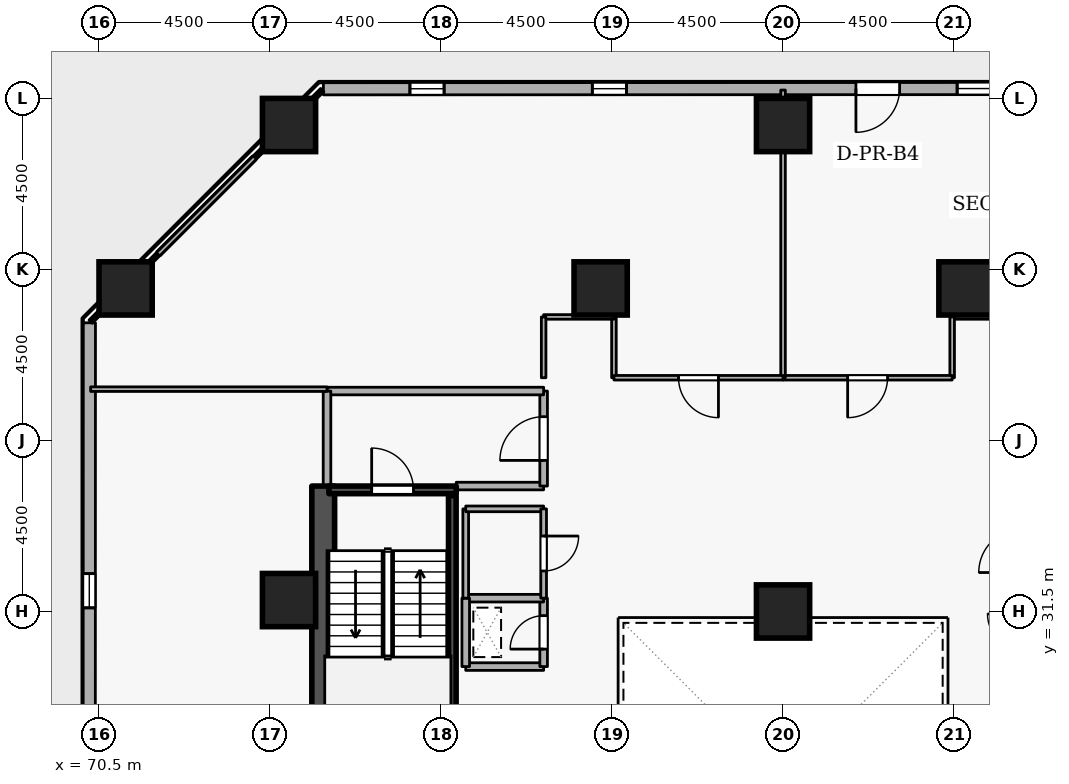
"""IFC4 building model, lengths in metres.
Left out: names, types, materials, properties, quantities, classifications, styles, units other than length and angle.
Written with IfcOpenShell. Run it as: python <this file> out.ifc"""

import sys

from ifc_helpers import new_model, si_unit, direction, frame, frame_2d, origin, origin_2d, place, context, subcontext, project, spatial, rectangle, extrude, element, fill, save


model = new_model("IFC4")
c1 = context("Model", 3, precision=1e-05, world=origin(), true_north=direction((0.0, 1.0)))
c2 = subcontext(c1, "Body", "Model", "MODEL_VIEW")
j1 = project(units=[si_unit("LENGTHUNIT", "METRE"), si_unit("PLANEANGLEUNIT", "RADIAN")], contexts=[c1])
p1 = place(None, origin())
s1 = spatial("IfcSite", under=j1, at=p1, CompositionType="ELEMENT")
p2 = place(p1, origin())
s2 = spatial("IfcBuilding", under=s1, at=p2, CompositionType="ELEMENT")
p3 = place(p2, frame((0.0, 0.0, 27.9)))
s3 = spatial("IfcBuildingStorey", under=s2, at=p3, CompositionType="ELEMENT", Elevation=27.9)
p4 = place(p3, frame((76.4, 19.2, 0.0), z_axis=(0.0, 0.0, 1.0), x_axis=(0.0, 1.0, 0.0)))
e1 = element("IfcWall", 1, at=p4, inside=s3, PredefinedType="SHEAR", context=c2, shape_type="SweptSolid", body=[
    extrude(rectangle(XDim=15.6, YDim=0.6, at=frame_2d((7.8, 0.0))), origin(), (0.0, 0.0, 1.0), 3.6),
])
for number, where, z_axis, x_axis in (
    (2, (88.5, 44.3, 0.0), (0.0, 0.0, 1.0), (1.0, 0.0, 0.0)),
    (3, (75.5, 44.3, 0.0), (0.0, 0.0, 1.0), (1.0, 0.0, 0.0)),
    (4, (71.2, 40.0, 0.0), (0.0, 0.0, 1.0), (1.0, 0.0, 0.0)),
    (5, (93.3, 40.0, 0.0), (0.0, 0.0, 1.0), (1.0, 0.0, 0.0)),
    (6, (83.7, 40.0, 0.0), (0.0, 0.0, 1.0), (1.0, 0.0, 0.0)),
    (7, (75.5, 31.8, 0.0), (0.0, 0.0, 1.0), (1.0, 0.0, 0.0)),
    (8, (88.5, 31.5, 0.0), (0.0, 0.0, 1.0), (1.0, 0.0, 0.0)),
):
    element("IfcColumn", number, at=place(p3, frame(where, z_axis=z_axis, x_axis=x_axis)), inside=s3, PredefinedType="COLUMN", context=c2, shape_type="SweptSolid", body=[
        extrude(rectangle(XDim=1.4, YDim=1.4, at=origin_2d()), origin(), (0.0, 0.0, 1.0), 3.6),
    ])
p5 = place(p3, frame((110.181, 45.265, 0.0), z_axis=(0.0, 0.0, 1.0), x_axis=(-0.999999942296, -0.000339718087, 0.0)))
e9 = element("IfcWall", 9, at=p5, inside=s3, PredefinedType="STANDARD", context=c2, shape_type="SweptSolid", body=[
    extrude(rectangle(XDim=33.777, YDim=0.32, at=frame_2d((16.888, 0.0))), origin(), (0.0, 0.0, 1.0), 2.7),
])
p6 = place(p5, frame((18.614, 0.0, 0.0)))
e10 = element("IfcOpeningElement", 10, at=p6, cuts=e9, PredefinedType="OPENING", context=c2, shape_type="SweptSolid", body=[
    extrude(rectangle(XDim=1.15, YDim=2.1, at=frame_2d((0.575, 1.05))), frame((0.0, 0.17, 0.0), z_axis=(0.0, -1.0, 0.0), x_axis=(1.0, 0.0, 0.0)), (0.0, 0.0, 1.0), 0.34),
])
p7 = place(p5, frame((1.8, 0.0, 0.72)))
e11 = element("IfcOpeningElement", 11, at=p7, cuts=e9, PredefinedType="OPENING", context=c2, shape_type="SweptSolid", body=[
    extrude(rectangle(XDim=0.9, YDim=1.75, at=frame_2d((0.45, 0.875))), frame((0.0, 0.17, 0.0), z_axis=(0.0, -1.0, 0.0), x_axis=(1.0, 0.0, 0.0)), (0.0, 0.0, 1.0), 0.34),
])
p8 = place(p5, frame((6.6, 0.0, 0.72)))
e12 = element("IfcOpeningElement", 12, at=p8, cuts=e9, PredefinedType="OPENING", context=c2, shape_type="SweptSolid", body=[
    extrude(rectangle(XDim=0.9, YDim=1.75, at=frame_2d((0.45, 0.875))), frame((0.0, 0.17, 0.0), z_axis=(0.0, -1.0, 0.0), x_axis=(1.0, 0.0, 0.0)), (0.0, 0.0, 1.0), 0.34),
])
p9 = place(p5, frame((11.4, 0.0, 0.72)))
e13 = element("IfcOpeningElement", 13, at=p9, cuts=e9, PredefinedType="OPENING", context=c2, shape_type="SweptSolid", body=[
    extrude(rectangle(XDim=0.9, YDim=1.75, at=frame_2d((0.45, 0.875))), frame((0.0, 0.17, 0.0), z_axis=(0.0, -1.0, 0.0), x_axis=(1.0, 0.0, 0.0)), (0.0, 0.0, 1.0), 0.34),
])
p10 = place(p5, frame((16.2, 0.0, 0.72)))
e14 = element("IfcOpeningElement", 14, at=p10, cuts=e9, PredefinedType="OPENING", context=c2, shape_type="SweptSolid", body=[
    extrude(rectangle(XDim=0.9, YDim=1.75, at=frame_2d((0.45, 0.875))), frame((0.0, 0.17, 0.0), z_axis=(0.0, -1.0, 0.0), x_axis=(1.0, 0.0, 0.0)), (0.0, 0.0, 1.0), 0.34),
])
p11 = place(p5, frame((25.8, 0.0, 0.72)))
e15 = element("IfcOpeningElement", 15, at=p11, cuts=e9, PredefinedType="OPENING", context=c2, shape_type="SweptSolid", body=[
    extrude(rectangle(XDim=0.9, YDim=1.75, at=frame_2d((0.45, 0.875))), frame((0.0, 0.17, 0.0), z_axis=(0.0, -1.0, 0.0), x_axis=(1.0, 0.0, 0.0)), (0.0, 0.0, 1.0), 0.34),
])
p12 = place(p5, frame((30.6, 0.0, 0.72)))
e16 = element("IfcOpeningElement", 16, at=p12, cuts=e9, PredefinedType="OPENING", context=c2, shape_type="SweptSolid", body=[
    extrude(rectangle(XDim=0.9, YDim=1.75, at=frame_2d((0.45, 0.875))), frame((0.0, 0.17, 0.0), z_axis=(0.0, -1.0, 0.0), x_axis=(1.0, 0.0, 0.0)), (0.0, 0.0, 1.0), 0.34),
])
p13 = place(p3, frame((70.247, 39.096, 0.0), z_axis=(0.0, 0.0, 1.0), x_axis=(-0.000339718087, -0.999999942296, 0.0)))
e17 = element("IfcWall", 17, at=p13, inside=s3, PredefinedType="STANDARD", context=c2, shape_type="SweptSolid", body=[
    extrude(rectangle(XDim=33.777, YDim=0.32, at=frame_2d((16.888, 0.0))), origin(), (0.0, 0.0, 1.0), 2.7),
])
p14 = place(p13, frame((6.6, 0.0, 0.72)))
e18 = element("IfcOpeningElement", 18, at=p14, cuts=e17, PredefinedType="OPENING", context=c2, shape_type="SweptSolid", body=[
    extrude(rectangle(XDim=0.9, YDim=1.75, at=frame_2d((0.45, 0.875))), frame((0.0, 0.17, 0.0), z_axis=(0.0, -1.0, 0.0), x_axis=(1.0, 0.0, 0.0)), (0.0, 0.0, 1.0), 0.34),
])
p15 = place(p13, frame((16.2, 0.0, 0.72)))
e19 = element("IfcOpeningElement", 19, at=p15, cuts=e17, PredefinedType="OPENING", context=c2, shape_type="SweptSolid", body=[
    extrude(rectangle(XDim=0.9, YDim=1.75, at=frame_2d((0.45, 0.875))), frame((0.0, 0.17, 0.0), z_axis=(0.0, -1.0, 0.0), x_axis=(1.0, 0.0, 0.0)), (0.0, 0.0, 1.0), 0.34),
])
p16 = place(p13, frame((21.0, 0.0, 0.72)))
e20 = element("IfcOpeningElement", 20, at=p16, cuts=e17, PredefinedType="OPENING", context=c2, shape_type="SweptSolid", body=[
    extrude(rectangle(XDim=0.9, YDim=1.75, at=frame_2d((0.45, 0.875))), frame((0.0, 0.17, 0.0), z_axis=(0.0, -1.0, 0.0), x_axis=(1.0, 0.0, 0.0)), (0.0, 0.0, 1.0), 0.34),
])
p17 = place(p13, frame((30.6, 0.0, 0.72)))
e21 = element("IfcOpeningElement", 21, at=p17, cuts=e17, PredefinedType="OPENING", context=c2, shape_type="SweptSolid", body=[
    extrude(rectangle(XDim=0.9, YDim=1.75, at=frame_2d((0.45, 0.875))), frame((0.0, 0.17, 0.0), z_axis=(0.0, -1.0, 0.0), x_axis=(1.0, 0.0, 0.0)), (0.0, 0.0, 1.0), 0.34),
])
p18 = place(p3, frame((76.55, 34.7, 0.0), z_axis=(0.0, 0.0, 1.0), x_axis=(1.0, 0.0, 0.0)))
e22 = element("IfcWall", 22, at=p18, inside=s3, PredefinedType="SHEAR", context=c2, shape_type="SweptSolid", body=[
    extrude(rectangle(XDim=3.35, YDim=0.2, at=frame_2d((1.675, 0.0))), origin(), (0.0, 0.0, 1.0), 3.6),
])
p19 = place(p18, frame((1.125, 0.0, 0.0)))
e23 = element("IfcOpeningElement", 23, at=p19, cuts=e22, PredefinedType="OPENING", context=c2, shape_type="SweptSolid", body=[
    extrude(rectangle(XDim=1.1, YDim=2.1, at=frame_2d((0.55, 1.05))), frame((0.0, 0.11, 0.0), z_axis=(0.0, -1.0, 0.0), x_axis=(1.0, 0.0, 0.0)), (0.0, 0.0, 1.0), 0.22),
])
p20 = place(p3, frame((79.797, 27.45, 0.0), z_axis=(0.0, 0.0, 1.0), x_axis=(0.0, 1.0, 0.0)))
e24 = element("IfcWall", 24, at=p20, inside=s3, PredefinedType="SHEAR", context=c2, shape_type="SweptSolid", body=[
    extrude(rectangle(XDim=7.1, YDim=0.2, at=frame_2d((3.55, 0.0))), origin(), (0.0, 0.0, 1.0), 3.6),
])
p21 = place(p3, frame((79.9, 34.8, 0.0), z_axis=(0.0, 0.0, 1.0), x_axis=(1.0, 0.0, 0.0)))
e25 = element("IfcWall", 25, at=p21, inside=s3, PredefinedType="STANDARD", context=c2, shape_type="SweptSolid", body=[
    extrude(rectangle(XDim=2.3, YDim=0.2, at=frame_2d((1.15, 0.0))), origin(), (0.0, 0.0, 1.0), 2.545),
])
p22 = place(p3, frame((82.2, 34.8, 0.0), z_axis=(0.0, 0.0, 1.0), x_axis=(0.0, 1.0, 0.0)))
e26 = element("IfcWall", 26, at=p22, inside=s3, PredefinedType="STANDARD", context=c2, shape_type="SweptSolid", body=[
    extrude(rectangle(XDim=2.5, YDim=0.2, at=frame_2d((1.25, 0.0))), origin(), (0.0, 0.0, 1.0), 3.34),
])
p23 = place(p22, frame((0.675, 0.0, 0.0)))
e27 = element("IfcOpeningElement", 27, at=p23, cuts=e26, PredefinedType="OPENING", context=c2, shape_type="SweptSolid", body=[
    extrude(rectangle(XDim=1.15, YDim=2.1, at=frame_2d((0.575, 1.05))), frame((0.0, 0.11, 0.0), z_axis=(0.0, -1.0, 0.0), x_axis=(1.0, 0.0, 0.0)), (0.0, 0.0, 1.0), 0.22),
])
p24 = place(p3, frame((82.2, 37.3, 0.0), z_axis=(0.0, 0.0, 1.0), x_axis=(-1.0, 0.0, 0.0)))
e28 = element("IfcWall", 28, at=p24, inside=s3, PredefinedType="STANDARD", context=c2, shape_type="SweptSolid", body=[
    extrude(rectangle(XDim=5.7, YDim=0.2, at=frame_2d((2.85, 0.0))), origin(), (0.0, 0.0, 1.0), 3.34),
])
p25 = place(p3, frame((76.5, 37.3, 0.0), z_axis=(0.0, 0.0, 1.0), x_axis=(0.0, -1.0, 0.0)))
e29 = element("IfcWall", 29, at=p25, inside=s3, PredefinedType="STANDARD", context=c2, shape_type="SweptSolid", body=[
    extrude(rectangle(XDim=2.5, YDim=0.2, at=frame_2d((1.25, 0.0))), origin(), (0.0, 0.0, 1.0), 3.34),
])
p26 = place(p3, frame((80.15, 30.05, 0.0), z_axis=(0.0, 0.0, 1.0), x_axis=(1.0, 0.0, 0.0)))
e30 = element("IfcWall", 30, at=p26, inside=s3, PredefinedType="STANDARD", context=c2, shape_type="SweptSolid", body=[
    extrude(rectangle(XDim=2.05, YDim=0.2, at=frame_2d((1.025, 0.0))), origin(), (0.0, 0.0, 1.0), 3.34),
])
p27 = place(p3, frame((82.2, 30.05, 0.0), z_axis=(0.0, 0.0, 1.0), x_axis=(0.0, 1.0, 0.0)))
e31 = element("IfcWall", 31, at=p27, inside=s3, PredefinedType="STANDARD", context=c2, shape_type="SweptSolid", body=[
    extrude(rectangle(XDim=1.8, YDim=0.2, at=frame_2d((0.9, 0.0))), origin(), (0.0, 0.0, 1.0), 3.34),
])
p28 = place(p27, frame((0.46, 0.0, 0.0)))
e32 = element("IfcOpeningElement", 32, at=p28, cuts=e31, PredefinedType="OPENING", context=c2, shape_type="SweptSolid", body=[
    extrude(rectangle(XDim=0.88, YDim=2.04, at=frame_2d((0.44, 1.02))), frame((0.0, 0.11, 0.0), z_axis=(0.0, -1.0, 0.0), x_axis=(1.0, 0.0, 0.0)), (0.0, 0.0, 1.0), 0.22),
])
p29 = place(p3, frame((82.2, 31.85, 0.0), z_axis=(0.0, 0.0, 1.0), x_axis=(-1.0, 0.0, 0.0)))
e33 = element("IfcWall", 33, at=p29, inside=s3, PredefinedType="STANDARD", context=c2, shape_type="SweptSolid", body=[
    extrude(rectangle(XDim=2.05, YDim=0.2, at=frame_2d((1.025, 0.0))), origin(), (0.0, 0.0, 1.0), 3.34),
])
p30 = place(p3, frame((80.15, 31.85, 0.0), z_axis=(0.0, 0.0, 1.0), x_axis=(0.0, -1.0, 0.0)))
e34 = element("IfcWall", 34, at=p30, inside=s3, PredefinedType="STANDARD", context=c2, shape_type="SweptSolid", body=[
    extrude(rectangle(XDim=1.8, YDim=0.2, at=frame_2d((0.9, 0.0))), origin(), (0.0, 0.0, 1.0), 3.34),
])
p31 = place(p3, frame((80.15, 31.85, 0.0), z_axis=(0.0, 0.0, 1.0), x_axis=(0.0, 1.0, 0.0)))
e35 = element("IfcWall", 35, at=p31, inside=s3, PredefinedType="PARTITIONING", context=c2, shape_type="SweptSolid", body=[
    extrude(rectangle(XDim=2.35, YDim=0.15, at=frame_2d((1.175, 0.0))), origin(), (0.0, 0.0, 1.0), 3.34),
])
p32 = place(p3, frame((80.15, 34.2, 0.0), z_axis=(0.0, 0.0, 1.0), x_axis=(1.0, 0.0, 0.0)))
e36 = element("IfcWall", 36, at=p32, inside=s3, PredefinedType="PARTITIONING", context=c2, shape_type="SweptSolid", body=[
    extrude(rectangle(XDim=2.05, YDim=0.15, at=frame_2d((1.025, 0.0))), origin(), (0.0, 0.0, 1.0), 2.545),
])
p33 = place(p3, frame((82.2, 34.2, 0.0), z_axis=(0.0, 0.0, 1.0), x_axis=(0.0, -1.0, 0.0)))
e37 = element("IfcWall", 37, at=p33, inside=s3, PredefinedType="PARTITIONING", context=c2, shape_type="SweptSolid", body=[
    extrude(rectangle(XDim=2.35, YDim=0.15, at=frame_2d((1.175, 0.0))), origin(), (0.0, 0.0, 1.0), 3.34),
])
p34 = place(p33, frame((0.715, 0.0, 0.0)))
e38 = element("IfcOpeningElement", 38, at=p34, cuts=e37, PredefinedType="OPENING", context=c2, shape_type="SweptSolid", body=[
    extrude(rectangle(XDim=0.92, YDim=2.08, at=frame_2d((0.46, 1.04))), frame((0.0, 0.085, 0.0), z_axis=(0.0, -1.0, 0.0), x_axis=(1.0, 0.0, 0.0)), (0.0, 0.0, 1.0), 0.17),
])
p35 = place(p3, frame((94.8, 39.25, 0.0), z_axis=(0.0, 0.0, 1.0), x_axis=(-1.0, 0.0, 0.0)))
e39 = element("IfcWall", 39, at=p35, inside=s3, PredefinedType="PARTITIONING", context=c2, shape_type="SweptSolid", body=[
    extrude(rectangle(XDim=1.85, YDim=0.12, at=frame_2d((0.925, 0.0))), origin(), (0.0, 0.0, 1.0), 3.34),
])
p36 = place(p3, frame((92.95, 39.25, 0.0), z_axis=(0.0, 0.0, 1.0), x_axis=(0.0, -1.0, 0.0)))
e40 = element("IfcWall", 40, at=p36, inside=s3, PredefinedType="PARTITIONING", context=c2, shape_type="SweptSolid", body=[
    extrude(rectangle(XDim=1.6, YDim=0.12, at=frame_2d((0.8, 0.0))), origin(), (0.0, 0.0, 1.0), 3.34),
])
p37 = place(p3, frame((92.95, 37.65, 0.0), z_axis=(0.0, 0.0, 1.0), x_axis=(-1.0, 0.0, 0.0)))
e41 = element("IfcWall", 41, at=p37, inside=s3, PredefinedType="PARTITIONING", context=c2, shape_type="SweptSolid", body=[
    extrude(rectangle(XDim=4.45, YDim=0.12, at=frame_2d((2.225, 0.0))), origin(), (0.0, 0.0, 1.0), 3.34),
])
p38 = place(p37, frame((1.7, 0.0, 0.0)))
e42 = element("IfcOpeningElement", 42, at=p38, cuts=e41, PredefinedType="OPENING", context=c2, shape_type="SweptSolid", body=[
    extrude(rectangle(XDim=1.05, YDim=2.1, at=frame_2d((0.525, 1.05))), frame((0.0, 0.07, 0.0), z_axis=(0.0, -1.0, 0.0), x_axis=(1.0, 0.0, 0.0)), (0.0, 0.0, 1.0), 0.14),
])
p39 = place(p3, frame((88.5, 37.65, 0.0), z_axis=(0.0, 0.0, 1.0), x_axis=(0.0, 1.0, 0.0)))
e43 = element("IfcWall", 43, at=p39, inside=s3, PredefinedType="PARTITIONING", context=c2, shape_type="SweptSolid", body=[
    extrude(rectangle(XDim=7.57, YDim=0.12, at=frame_2d((3.785, 0.0))), origin(), (0.0, 0.0, 1.0), 2.878),
])
p40 = place(p3, frame((84.05, 37.65, 0.0), z_axis=(0.0, 0.0, 1.0), x_axis=(0.0, 1.0, 0.0)))
e44 = element("IfcWall", 44, at=p40, inside=s3, PredefinedType="PARTITIONING", context=c2, shape_type="SweptSolid", body=[
    extrude(rectangle(XDim=1.6, YDim=0.12, at=frame_2d((0.8, 0.0))), origin(), (0.0, 0.0, 1.0), 3.34),
])
p41 = place(p3, frame((84.05, 39.25, 0.0), z_axis=(0.0, 0.0, 1.0), x_axis=(-1.0, 0.0, 0.0)))
e45 = element("IfcWall", 45, at=p41, inside=s3, PredefinedType="PARTITIONING", context=c2, shape_type="SweptSolid", body=[
    extrude(rectangle(XDim=1.85, YDim=0.12, at=frame_2d((0.925, 0.0))), origin(), (0.0, 0.0, 1.0), 3.34),
])
p42 = place(p3, frame((82.2, 39.25, 0.0), z_axis=(0.0, 0.0, 1.0), x_axis=(0.0, -1.0, 0.0)))
e46 = element("IfcWall", 46, at=p42, inside=s3, PredefinedType="PARTITIONING", context=c2, shape_type="SweptSolid", body=[
    extrude(rectangle(XDim=1.6, YDim=0.12, at=frame_2d((0.8, 0.0))), origin(), (0.0, 0.0, 1.0), 3.34),
])
p43 = place(p3, frame((76.5, 37.35, 0.0), z_axis=(0.0, 0.0, 1.0), x_axis=(-1.0, 0.0, 0.0)))
e47 = element("IfcWall", 47, at=p43, inside=s3, PredefinedType="PARTITIONING", context=c2, shape_type="SweptSolid", body=[
    extrude(rectangle(XDim=6.22, YDim=0.12, at=frame_2d((3.11, 0.0))), origin(), (0.0, 0.0, 1.0), 3.34),
])
p44 = place(p3, frame((70.28, 39.125, 0.0), z_axis=(0.0, 0.0, 1.0), x_axis=(0.707106781187, 0.707106781187, 0.0)))
e48 = element("IfcWall", 48, at=p44, inside=s3, PredefinedType="PARTITIONING", context=c2, shape_type="SweptSolid", body=[
    extrude(rectangle(XDim=8.619, YDim=0.12, at=frame_2d((4.31, 0.0))), origin(), (0.0, 0.0, 1.0), 3.34),
])
p45 = place(p3, frame((88.5, 37.65, 0.0), z_axis=(0.0, 0.0, 1.0), x_axis=(-1.0, 0.0, 0.0)))
e49 = element("IfcWall", 49, at=p45, inside=s3, PredefinedType="PARTITIONING", context=c2, shape_type="SweptSolid", body=[
    extrude(rectangle(XDim=4.45, YDim=0.12, at=frame_2d((2.225, 0.0))), origin(), (0.0, 0.0, 1.0), 3.34),
])
p46 = place(p45, frame((1.7, 0.0, 0.0)))
e50 = element("IfcOpeningElement", 50, at=p46, cuts=e49, PredefinedType="OPENING", context=c2, shape_type="SweptSolid", body=[
    extrude(rectangle(XDim=1.05, YDim=2.1, at=frame_2d((0.525, 1.05))), frame((0.0, 0.07, 0.0), z_axis=(0.0, -1.0, 0.0), x_axis=(1.0, 0.0, 0.0)), (0.0, 0.0, 1.0), 0.14),
])
p47 = place(p6, origin())
e51 = element("IfcDoor", 51, at=p47, inside=s3, OperationType="SINGLE_SWING_RIGHT", PredefinedType="DOOR", context=c2, shape_type="SweptSolid", body=[
    extrude(rectangle(XDim=1.15, YDim=2.1, at=frame_2d((0.575, 1.05))), frame((0.0, 0.025, 0.0), z_axis=(0.0, -1.0, 0.0), x_axis=(1.0, 0.0, 0.0)), (0.0, 0.0, 1.0), 0.05),
])
fill(e10, e51)
p48 = place(p10, origin())
e52 = element("IfcWindow", 52, at=p48, inside=s3, PartitioningType="SINGLE_PANEL", PredefinedType="WINDOW", context=c2, shape_type="SweptSolid", body=[
    extrude(rectangle(XDim=0.9, YDim=1.75, at=frame_2d((0.45, 0.875))), frame((0.0, 0.03, 0.0), z_axis=(0.0, -1.0, 0.0), x_axis=(1.0, 0.0, 0.0)), (0.0, 0.0, 1.0), 0.06),
])
fill(e14, e52)
p49 = place(p11, origin())
e53 = element("IfcWindow", 53, at=p49, inside=s3, PartitioningType="SINGLE_PANEL", PredefinedType="WINDOW", context=c2, shape_type="SweptSolid", body=[
    extrude(rectangle(XDim=0.9, YDim=1.75, at=frame_2d((0.45, 0.875))), frame((0.0, 0.03, 0.0), z_axis=(0.0, -1.0, 0.0), x_axis=(1.0, 0.0, 0.0)), (0.0, 0.0, 1.0), 0.06),
])
fill(e15, e53)
p50 = place(p12, origin())
e54 = element("IfcWindow", 54, at=p50, inside=s3, PartitioningType="SINGLE_PANEL", PredefinedType="WINDOW", context=c2, shape_type="SweptSolid", body=[
    extrude(rectangle(XDim=0.9, YDim=1.75, at=frame_2d((0.45, 0.875))), frame((0.0, 0.03, 0.0), z_axis=(0.0, -1.0, 0.0), x_axis=(1.0, 0.0, 0.0)), (0.0, 0.0, 1.0), 0.06),
])
fill(e16, e54)
p51 = place(p14, origin())
e55 = element("IfcWindow", 55, at=p51, inside=s3, PartitioningType="SINGLE_PANEL", PredefinedType="WINDOW", context=c2, shape_type="SweptSolid", body=[
    extrude(rectangle(XDim=0.9, YDim=1.75, at=frame_2d((0.45, 0.875))), frame((0.0, 0.03, 0.0), z_axis=(0.0, -1.0, 0.0), x_axis=(1.0, 0.0, 0.0)), (0.0, 0.0, 1.0), 0.06),
])
fill(e18, e55)
p52 = place(p19, origin())
e56 = element("IfcDoor", 56, at=p52, inside=s3, OperationType="SINGLE_SWING_LEFT", PredefinedType="DOOR", context=c2, shape_type="SweptSolid", body=[
    extrude(rectangle(XDim=1.1, YDim=2.1, at=frame_2d((0.55, 1.05))), frame((0.0, 0.025, 0.0), z_axis=(0.0, -1.0, 0.0), x_axis=(1.0, 0.0, 0.0)), (0.0, 0.0, 1.0), 0.05),
])
fill(e23, e56)
p53 = place(p23, origin())
e57 = element("IfcDoor", 57, at=p53, inside=s3, OperationType="SINGLE_SWING_LEFT", PredefinedType="DOOR", context=c2, shape_type="SweptSolid", body=[
    extrude(rectangle(XDim=1.15, YDim=2.1, at=frame_2d((0.575, 1.05))), frame((0.0, 0.025, 0.0), z_axis=(0.0, -1.0, 0.0), x_axis=(1.0, 0.0, 0.0)), (0.0, 0.0, 1.0), 0.05),
])
fill(e27, e57)
p54 = place(p28, origin())
e58 = element("IfcDoor", 58, at=p54, inside=s3, OperationType="SINGLE_SWING_LEFT", PredefinedType="DOOR", context=c2, shape_type="SweptSolid", body=[
    extrude(rectangle(XDim=0.88, YDim=2.04, at=frame_2d((0.44, 1.02))), frame((0.0, 0.025, 0.0), z_axis=(0.0, -1.0, 0.0), x_axis=(1.0, 0.0, 0.0)), (0.0, 0.0, 1.0), 0.05),
])
fill(e32, e58)
p55 = place(p34, origin())
e59 = element("IfcDoor", 59, at=p55, inside=s3, OperationType="SINGLE_SWING_LEFT", PredefinedType="DOOR", context=c2, shape_type="SweptSolid", body=[
    extrude(rectangle(XDim=0.92, YDim=2.08, at=frame_2d((0.46, 1.04))), frame((0.0, 0.025, 0.0), z_axis=(0.0, -1.0, 0.0), x_axis=(1.0, 0.0, 0.0)), (0.0, 0.0, 1.0), 0.05),
])
fill(e38, e59)
p56 = place(p38, origin())
e60 = element("IfcDoor", 60, at=p56, inside=s3, OperationType="SINGLE_SWING_RIGHT", PredefinedType="DOOR", context=c2, shape_type="SweptSolid", body=[
    extrude(rectangle(XDim=1.05, YDim=2.1, at=frame_2d((0.525, 1.05))), frame((0.0, 0.025, 0.0), z_axis=(0.0, -1.0, 0.0), x_axis=(1.0, 0.0, 0.0)), (0.0, 0.0, 1.0), 0.05),
])
fill(e42, e60)
p57 = place(p46, origin())
e61 = element("IfcDoor", 61, at=p57, inside=s3, OperationType="SINGLE_SWING_LEFT", PredefinedType="DOOR", context=c2, shape_type="SweptSolid", body=[
    extrude(rectangle(XDim=1.05, YDim=2.1, at=frame_2d((0.525, 1.05))), frame((0.0, 0.025, 0.0), z_axis=(0.0, -1.0, 0.0), x_axis=(1.0, 0.0, 0.0)), (0.0, 0.0, 1.0), 0.05),
])
fill(e50, e61)
save(model, sys.argv[1])
